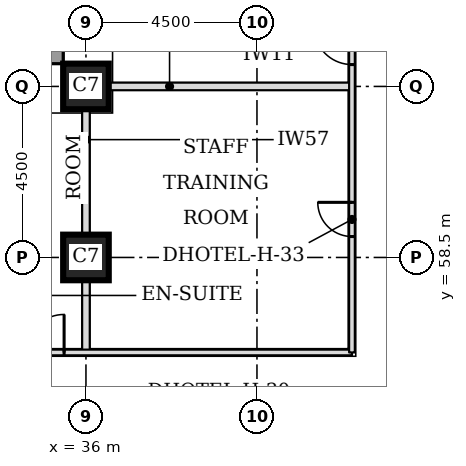
"""IFC4 building model, lengths in metres.
Left out: names, types, materials, properties, quantities, classifications, styles, units other than length and angle.
Written with IfcOpenShell. Run it as: python <this file> out.ifc"""

import sys

from ifc_helpers import new_model, si_unit, direction, frame, frame_2d, origin, origin_2d, place, context, subcontext, project, spatial, rectangle, extrude, element, fill, save


model = new_model("IFC4")
c1 = context("Model", 3, precision=1e-05, world=origin(), true_north=direction((0.0, 1.0)))
c2 = subcontext(c1, "Body", "Model", "MODEL_VIEW")
j1 = project(units=[si_unit("LENGTHUNIT", "METRE"), si_unit("PLANEANGLEUNIT", "RADIAN")], contexts=[c1])
p1 = place(None, origin())
s1 = spatial("IfcSite", under=j1, at=p1, CompositionType="ELEMENT")
p2 = place(p1, origin())
s2 = spatial("IfcBuilding", under=s1, at=p2, CompositionType="ELEMENT")
p3 = place(p2, frame((0.0, 0.0, 46.2)))
s3 = spatial("IfcBuildingStorey", under=s2, at=p3, CompositionType="ELEMENT", Elevation=46.2)
for number, where, z_axis, x_axis in (
    (1, (36.0, 58.5, 0.0), (0.0, 0.0, 1.0), (1.0, 0.0, 0.0)),
    (2, (36.0, 63.0, 0.0), (0.0, 0.0, 1.0), (1.0, 0.0, 0.0)),
):
    element("IfcColumn", number, at=place(p3, frame(where, z_axis=z_axis, x_axis=x_axis)), inside=s3, PredefinedType="COLUMN", context=c2, shape_type="SweptSolid", body=[
        extrude(rectangle(XDim=1.2, YDim=1.2, at=origin_2d()), origin(), (0.0, 0.0, 1.0), 3.3),
    ])
p4 = place(p3, frame((35.225, 76.894, 0.0), z_axis=(0.0, 0.0, 1.0), x_axis=(0.0, -1.0, 0.0)))
e3 = element("IfcWall", 3, at=p4, inside=s3, PredefinedType="STANDARD", context=c2, shape_type="SweptSolid", body=[
    extrude(rectangle(XDim=13.293, YDim=0.35, at=frame_2d((6.647, 0.0))), origin(), (0.0, 0.0, 1.0), 3.055),
])
p5 = place(p4, frame((9.493, 0.0, 0.8)))
e4 = element("IfcOpeningElement", 4, at=p5, cuts=e3, PredefinedType="OPENING", context=c2, shape_type="SweptSolid", body=[
    extrude(rectangle(XDim=3.3, YDim=1.5, at=frame_2d((1.65, 0.75))), frame((0.0, 0.185, 0.0), z_axis=(0.0, -1.0, 0.0), x_axis=(1.0, 0.0, 0.0)), (0.0, 0.0, 1.0), 0.37),
])
p6 = place(p3, frame((35.4, 63.775, 0.0), z_axis=(0.0, 0.0, 1.0), x_axis=(-1.0, 0.0, 0.0)))
e5 = element("IfcWall", 5, at=p6, inside=s3, PredefinedType="STANDARD", context=c2, shape_type="SweptSolid", body=[
    extrude(rectangle(XDim=17.793, YDim=0.35, at=frame_2d((8.897, 0.0))), origin(), (0.0, 0.0, 1.0), 3.055),
])
p7 = place(p6, frame((0.5, 0.0, 0.8)))
e6 = element("IfcOpeningElement", 6, at=p7, cuts=e5, PredefinedType="OPENING", context=c2, shape_type="SweptSolid", body=[
    extrude(rectangle(XDim=3.3, YDim=1.5, at=frame_2d((1.65, 0.75))), frame((0.0, 0.185, 0.0), z_axis=(0.0, -1.0, 0.0), x_axis=(1.0, 0.0, 0.0)), (0.0, 0.0, 1.0), 0.37),
])
p8 = place(p6, frame((9.0, 0.0, 0.8)))
e7 = element("IfcOpeningElement", 7, at=p8, cuts=e5, PredefinedType="OPENING", context=c2, shape_type="SweptSolid", body=[
    extrude(rectangle(XDim=3.3, YDim=1.5, at=frame_2d((1.65, 0.75))), frame((0.0, 0.185, 0.0), z_axis=(0.0, -1.0, 0.0), x_axis=(1.0, 0.0, 0.0)), (0.0, 0.0, 1.0), 0.37),
])
p9 = place(p3, frame((36.0, 56.0, 0.0), z_axis=(0.0, 0.0, 1.0), x_axis=(0.0, 1.0, 0.0)))
e8 = element("IfcWall", 8, at=p9, inside=s3, PredefinedType="PARTITIONING", context=c2, shape_type="SweptSolid", body=[
    extrude(rectangle(XDim=6.4, YDim=0.2, at=frame_2d((3.2, 0.0))), origin(), (0.0, 0.0, 1.0), 2.33),
])
p10 = place(p3, frame((36.6, 63.0, 0.0), z_axis=(0.0, 0.0, 1.0), x_axis=(1.0, 0.0, 0.0)))
e9 = element("IfcWall", 9, at=p10, inside=s3, PredefinedType="PARTITIONING", context=c2, shape_type="SweptSolid", body=[
    extrude(rectangle(XDim=6.4, YDim=0.2, at=frame_2d((3.2, 0.0))), origin(), (0.0, 0.0, 1.0), 3.08),
])
p11 = place(p3, frame((27.0, 56.0, 0.0), z_axis=(0.0, 0.0, 1.0), x_axis=(1.0, 0.0, 0.0)))
e10 = element("IfcWall", 10, at=p11, inside=s3, PredefinedType="PARTITIONING", context=c2, shape_type="SweptSolid", body=[
    extrude(rectangle(XDim=16.0, YDim=0.15, at=frame_2d((8.0, 0.0))), origin(), (0.0, 0.0, 1.0), 3.08),
])
p12 = place(p11, frame((7.425, 0.0, 0.0)))
e11 = element("IfcOpeningElement", 11, at=p12, cuts=e10, PredefinedType="OPENING", context=c2, shape_type="SweptSolid", body=[
    extrude(rectangle(XDim=1.0, YDim=2.1, at=frame_2d((0.5, 1.05))), frame((0.0, 0.085, 0.0), z_axis=(0.0, -1.0, 0.0), x_axis=(1.0, 0.0, 0.0)), (0.0, 0.0, 1.0), 0.17),
])
p13 = place(p11, frame((1.91, 0.0, 0.0)))
e12 = element("IfcOpeningElement", 12, at=p13, cuts=e10, PredefinedType="OPENING", context=c2, shape_type="SweptSolid", body=[
    extrude(rectangle(XDim=0.9, YDim=2.1, at=frame_2d((0.45, 1.05))), frame((0.0, 0.085, 0.0), z_axis=(0.0, -1.0, 0.0), x_axis=(1.0, 0.0, 0.0)), (0.0, 0.0, 1.0), 0.17),
])
p14 = place(p3, frame((43.0, 56.0, 0.0), z_axis=(0.0, 0.0, 1.0), x_axis=(0.0, 1.0, 0.0)))
e13 = element("IfcWall", 13, at=p14, inside=s3, PredefinedType="PARTITIONING", context=c2, shape_type="SweptSolid", body=[
    extrude(rectangle(XDim=18.0, YDim=0.15, at=frame_2d((9.0, 0.0))), origin(), (0.0, 0.0, 1.0), 3.08),
])
p15 = place(p14, frame((7.575, 0.0, 0.0)))
e14 = element("IfcOpeningElement", 14, at=p15, cuts=e13, PredefinedType="OPENING", context=c2, shape_type="SweptSolid", body=[
    extrude(rectangle(XDim=1.0, YDim=2.1, at=frame_2d((0.5, 1.05))), frame((0.0, 0.085, 0.0), z_axis=(0.0, -1.0, 0.0), x_axis=(1.0, 0.0, 0.0)), (0.0, 0.0, 1.0), 0.17),
])
p16 = place(p14, frame((16.553, 0.0, 0.0)))
e15 = element("IfcOpeningElement", 15, at=p16, cuts=e13, PredefinedType="OPENING", context=c2, shape_type="SweptSolid", body=[
    extrude(rectangle(XDim=1.0, YDim=2.1, at=frame_2d((0.5, 1.05))), frame((0.0, 0.085, 0.0), z_axis=(0.0, -1.0, 0.0), x_axis=(1.0, 0.0, 0.0)), (0.0, 0.0, 1.0), 0.17),
])
p17 = place(p14, frame((3.05, 0.0, 0.0)))
e16 = element("IfcOpeningElement", 16, at=p17, cuts=e13, PredefinedType="OPENING", context=c2, shape_type="SweptSolid", body=[
    extrude(rectangle(XDim=0.9, YDim=2.1, at=frame_2d((0.45, 1.05))), frame((0.0, 0.085, 0.0), z_axis=(0.0, -1.0, 0.0), x_axis=(1.0, 0.0, 0.0)), (0.0, 0.0, 1.0), 0.17),
])
p18 = place(p12, origin())
e17 = element("IfcDoor", 17, at=p18, inside=s3, OperationType="SINGLE_SWING_RIGHT", PredefinedType="DOOR", context=c2, shape_type="SweptSolid", body=[
    extrude(rectangle(XDim=1.0, YDim=2.1, at=frame_2d((0.5, 1.05))), frame((0.0, 0.025, 0.0), z_axis=(0.0, -1.0, 0.0), x_axis=(1.0, 0.0, 0.0)), (0.0, 0.0, 1.0), 0.05),
])
fill(e11, e17)
p19 = place(p15, origin())
e18 = element("IfcDoor", 18, at=p19, inside=s3, OperationType="SINGLE_SWING_RIGHT", PredefinedType="DOOR", context=c2, shape_type="SweptSolid", body=[
    extrude(rectangle(XDim=1.0, YDim=2.1, at=frame_2d((0.5, 1.05))), frame((0.0, 0.025, 0.0), z_axis=(0.0, -1.0, 0.0), x_axis=(1.0, 0.0, 0.0)), (0.0, 0.0, 1.0), 0.05),
])
fill(e14, e18)
p20 = place(p17, origin())
e19 = element("IfcDoor", 19, at=p20, inside=s3, OperationType="SINGLE_SWING_RIGHT", PredefinedType="DOOR", context=c2, shape_type="SweptSolid", body=[
    extrude(rectangle(XDim=0.9, YDim=2.1, at=frame_2d((0.45, 1.05))), frame((0.0, 0.025, 0.0), z_axis=(0.0, -1.0, 0.0), x_axis=(1.0, 0.0, 0.0)), (0.0, 0.0, 1.0), 0.05),
])
fill(e16, e19)
save(model, sys.argv[1])
